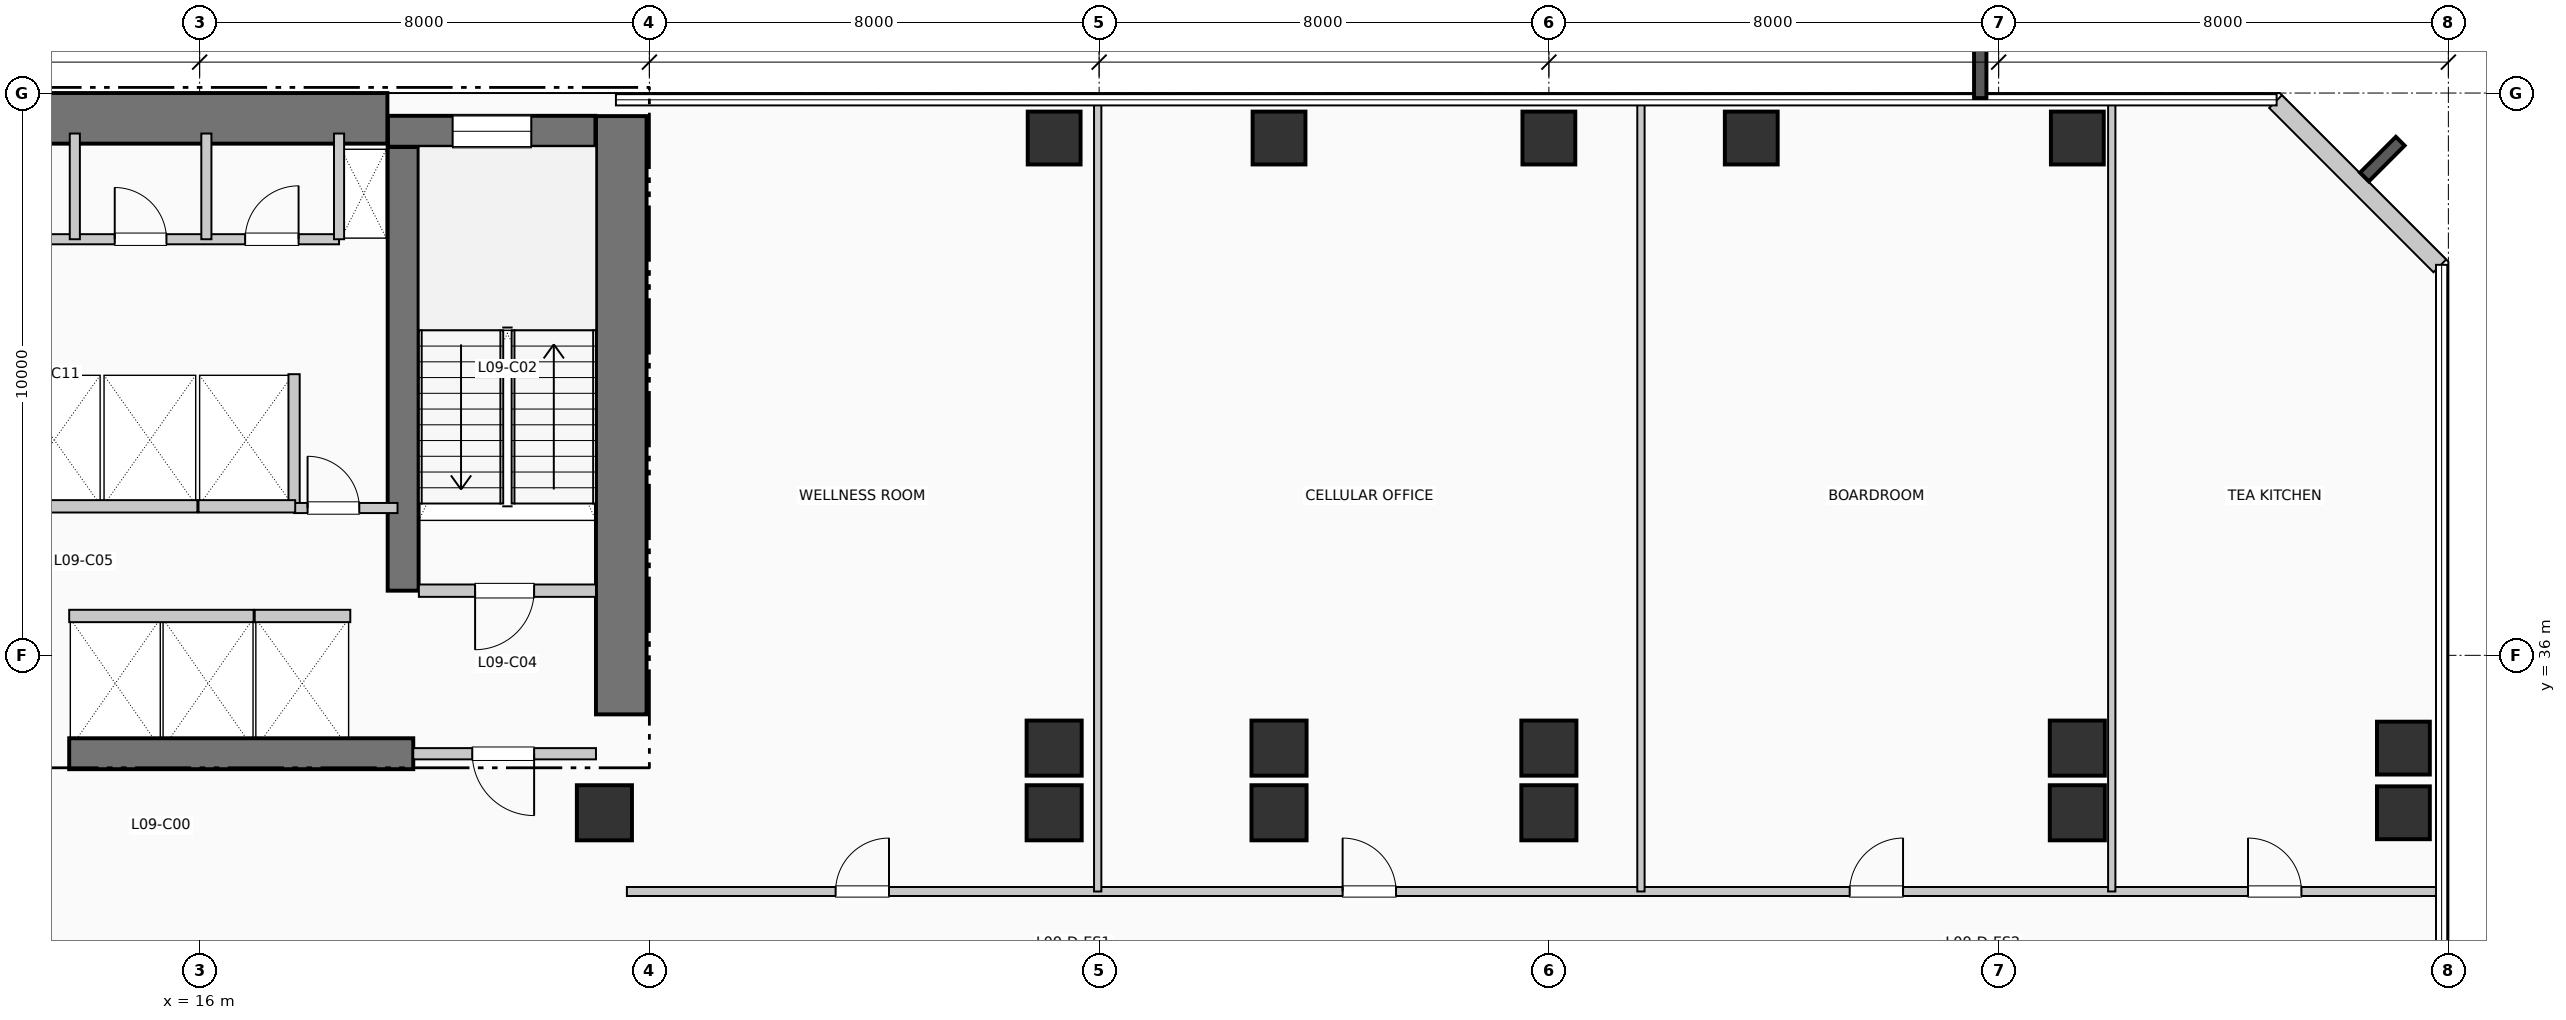
"""IFC4 building model, lengths in metres.
Left out: names, types, materials, properties, quantities, classifications, styles, units other than length and angle.
Written with IfcOpenShell. Run it as: python <this file> out.ifc"""

import sys

from ifc_helpers import new_model, si_unit, direction, frame, frame_2d, origin, origin_2d, place, context, subcontext, project, spatial, rectangle, extrude, element, fill, save


model = new_model("IFC4")
c1 = context("Model", 3, precision=1e-05, world=origin(), true_north=direction((0.0, 1.0)))
c2 = subcontext(c1, "Body", "Model", "MODEL_VIEW")
j1 = project(units=[si_unit("LENGTHUNIT", "METRE"), si_unit("PLANEANGLEUNIT", "RADIAN")], contexts=[c1])
p1 = place(None, origin())
s1 = spatial("IfcSite", under=j1, at=p1, CompositionType="ELEMENT")
p2 = place(p1, origin())
s2 = spatial("IfcBuilding", under=s1, at=p2, CompositionType="ELEMENT")
p3 = place(p2, frame((0.0, 0.0, 42.24)))
s3 = spatial("IfcBuildingStorey", under=s2, at=p3, CompositionType="ELEMENT", Elevation=42.24)
p4 = place(p3, frame((5.36, 45.55, 0.0), z_axis=(0.0, 0.0, 1.0), x_axis=(1.0, 0.0, 0.0)))
e1 = element("IfcWall", 1, at=p4, inside=s3, PredefinedType="SHEAR", context=c2, shape_type="SweptSolid", body=[
    extrude(rectangle(XDim=13.98, YDim=0.9, at=frame_2d((6.99, 0.0))), origin(), (0.0, 0.0, 1.0), 3.96),
])
p5 = place(p3, frame((23.5, 34.95, 0.0), z_axis=(0.0, 0.0, 1.0), x_axis=(0.0, 1.0, 0.0)))
e2 = element("IfcWall", 2, at=p5, inside=s3, PredefinedType="SHEAR", context=c2, shape_type="SweptSolid", body=[
    extrude(rectangle(XDim=10.64, YDim=0.9, at=frame_2d((5.32, 0.0))), origin(), (0.0, 0.0, 1.0), 3.96),
])
p6 = place(p3, frame((13.68, 34.25, 0.0), z_axis=(0.0, 0.0, 1.0), x_axis=(1.0, 0.0, 0.0)))
e3 = element("IfcWall", 3, at=p6, inside=s3, PredefinedType="SHEAR", context=c2, shape_type="SweptSolid", body=[
    extrude(rectangle(XDim=6.12, YDim=0.55, at=frame_2d((3.06, 0.0))), origin(), (0.0, 0.0, 1.0), 3.96),
])
p7 = place(p3, frame((19.62, 37.15, 0.0), z_axis=(0.0, 0.0, 1.0), x_axis=(0.0, 1.0, 0.0)))
e4 = element("IfcWall", 4, at=p7, inside=s3, PredefinedType="SHEAR", context=c2, shape_type="SweptSolid", body=[
    extrude(rectangle(XDim=7.89, YDim=0.55, at=frame_2d((3.945, 0.0))), origin(), (0.0, 0.0, 1.0), 3.96),
])
p8 = place(p3, frame((19.35, 45.32, 0.0), z_axis=(0.0, 0.0, 1.0), x_axis=(1.0, 0.0, 0.0)))
e5 = element("IfcWall", 5, at=p8, inside=s3, PredefinedType="SHEAR", context=c2, shape_type="SweptSolid", body=[
    extrude(rectangle(XDim=3.69, YDim=0.55, at=frame_2d((1.845, 0.0))), origin(), (0.0, 0.0, 1.0), 3.96),
])
p9 = place(p8, frame((1.15, 0.0, 1.05)))
e6 = element("IfcOpeningElement", 6, at=p9, cuts=e5, PredefinedType="OPENING", context=c2, shape_type="SweptSolid", body=[
    extrude(rectangle(XDim=1.4, YDim=1.8, at=frame_2d((0.7, 0.9))), frame((0.0, 0.285, 0.0), z_axis=(0.0, -1.0, 0.0), x_axis=(1.0, 0.0, 0.0)), (0.0, 0.0, 1.0), 0.57),
])
for number, where, z_axis, x_axis in (
    (7, (23.2, 33.2, 0.0), (0.0, 0.0, 1.0), (1.0, 0.0, 0.0)),
    (8, (31.2, 33.2, 0.0), (0.0, 0.0, 1.0), (1.0, 0.0, 0.0)),
    (9, (31.2, 34.35, 0.0), (0.0, 0.0, 1.0), (1.0, 0.0, 0.0)),
):
    element("IfcColumn", number, at=place(p3, frame(where, z_axis=z_axis, x_axis=x_axis)), inside=s3, PredefinedType="COLUMN", context=c2, shape_type="SweptSolid", body=[
        extrude(rectangle(XDim=0.98, YDim=0.98, at=origin_2d()), origin(), (0.0, 0.0, 1.0), 3.96),
    ])
p10 = place(p3, frame((31.2, 45.2, 0.0), z_axis=(0.0, 0.0, 1.0), x_axis=(1.0, 0.0, 0.0)))
e10 = element("IfcColumn", 10, at=p10, inside=s3, PredefinedType="COLUMN", context=c2, shape_type="SweptSolid", body=[
    extrude(rectangle(XDim=0.94, YDim=0.94, at=origin_2d()), origin(), (0.0, 0.0, 1.0), 3.96),
])
for number, where, z_axis, x_axis in (
    (11, (35.2, 33.2, 0.0), (0.0, 0.0, 1.0), (1.0, 0.0, 0.0)),
    (12, (35.2, 34.35, 0.0), (0.0, 0.0, 1.0), (1.0, 0.0, 0.0)),
):
    element("IfcColumn", number, at=place(p3, frame(where, z_axis=z_axis, x_axis=x_axis)), inside=s3, PredefinedType="COLUMN", context=c2, shape_type="SweptSolid", body=[
        extrude(rectangle(XDim=0.98, YDim=0.98, at=origin_2d()), origin(), (0.0, 0.0, 1.0), 3.96),
    ])
p11 = place(p3, frame((35.2, 45.2, 0.0), z_axis=(0.0, 0.0, 1.0), x_axis=(1.0, 0.0, 0.0)))
e13 = element("IfcColumn", 13, at=p11, inside=s3, PredefinedType="COLUMN", context=c2, shape_type="SweptSolid", body=[
    extrude(rectangle(XDim=0.94, YDim=0.94, at=origin_2d()), origin(), (0.0, 0.0, 1.0), 3.96),
])
for number, where, z_axis, x_axis in (
    (14, (40.0, 33.2, 0.0), (0.0, 0.0, 1.0), (1.0, 0.0, 0.0)),
    (15, (40.0, 34.35, 0.0), (0.0, 0.0, 1.0), (1.0, 0.0, 0.0)),
):
    element("IfcColumn", number, at=place(p3, frame(where, z_axis=z_axis, x_axis=x_axis)), inside=s3, PredefinedType="COLUMN", context=c2, shape_type="SweptSolid", body=[
        extrude(rectangle(XDim=0.98, YDim=0.98, at=origin_2d()), origin(), (0.0, 0.0, 1.0), 3.96),
    ])
for number, where, z_axis, x_axis in (
    (16, (40.0, 45.2, 0.0), (0.0, 0.0, 1.0), (1.0, 0.0, 0.0)),
    (17, (43.6, 45.2, 0.0), (0.0, 0.0, 1.0), (1.0, 0.0, 0.0)),
):
    element("IfcColumn", number, at=place(p3, frame(where, z_axis=z_axis, x_axis=x_axis)), inside=s3, PredefinedType="COLUMN", context=c2, shape_type="SweptSolid", body=[
        extrude(rectangle(XDim=0.94, YDim=0.94, at=origin_2d()), origin(), (0.0, 0.0, 1.0), 3.96),
    ])
for number, where, z_axis, x_axis in (
    (18, (49.4, 33.2, 0.0), (0.0, 0.0, 1.0), (1.0, 0.0, 0.0)),
    (19, (49.4, 34.35, 0.0), (0.0, 0.0, 1.0), (1.0, 0.0, 0.0)),
):
    element("IfcColumn", number, at=place(p3, frame(where, z_axis=z_axis, x_axis=x_axis)), inside=s3, PredefinedType="COLUMN", context=c2, shape_type="SweptSolid", body=[
        extrude(rectangle(XDim=0.98, YDim=0.98, at=origin_2d()), origin(), (0.0, 0.0, 1.0), 3.96),
    ])
for number, where, z_axis, x_axis in (
    (20, (49.4, 45.2, 0.0), (0.0, 0.0, 1.0), (1.0, 0.0, 0.0)),
    (21, (55.2, 33.2, 0.0), (0.0, 0.0, 1.0), (1.0, 0.0, 0.0)),
    (22, (55.2, 34.35, 0.0), (0.0, 0.0, 1.0), (1.0, 0.0, 0.0)),
):
    element("IfcColumn", number, at=place(p3, frame(where, z_axis=z_axis, x_axis=x_axis)), inside=s3, PredefinedType="COLUMN", context=c2, shape_type="SweptSolid", body=[
        extrude(rectangle(XDim=0.94, YDim=0.94, at=origin_2d()), origin(), (0.0, 0.0, 1.0), 3.96),
    ])
p12 = place(p3, frame((55.848, 42.926, 0.0), z_axis=(0.0, 0.0, 1.0), x_axis=(-0.707106781187, 0.707106781187, 0.0)))
e23 = element("IfcWall", 23, at=p12, inside=s3, PredefinedType="SOLIDWALL", context=c2, shape_type="SweptSolid", body=[
    extrude(rectangle(XDim=4.133, YDim=0.32, at=frame_2d((2.066, 0.0))), origin(), (0.0, 0.0, 1.0), 3.71),
])
p13 = place(p3, frame((19.9, 37.15, 0.0), z_axis=(0.0, 0.0, 1.0), x_axis=(1.0, 0.0, 0.0)))
e24 = element("IfcWall", 24, at=p13, inside=s3, PredefinedType="PARTITIONING", context=c2, shape_type="SweptSolid", body=[
    extrude(rectangle(XDim=3.15, YDim=0.22, at=frame_2d((1.575, 0.0))), origin(), (0.0, 0.0, 1.0), 3.71),
])
p14 = place(p13, frame((2.05, 0.0, 0.0), z_axis=(0.0, 0.0, 1.0), x_axis=(-1.0, 0.0, 0.0)))
e25 = element("IfcOpeningElement", 25, at=p14, cuts=e24, PredefinedType="OPENING", context=c2, shape_type="SweptSolid", body=[
    extrude(rectangle(XDim=1.05, YDim=2.15, at=frame_2d((0.525, 1.075))), frame((0.0, 0.12, 0.0), z_axis=(0.0, -1.0, 0.0), x_axis=(1.0, 0.0, 0.0)), (0.0, 0.0, 1.0), 0.24),
])
p15 = place(p3, frame((19.8, 34.25, 0.0), z_axis=(0.0, 0.0, 1.0), x_axis=(1.0, 0.0, 0.0)))
e26 = element("IfcWall", 26, at=p15, inside=s3, PredefinedType="PARTITIONING", context=c2, shape_type="SweptSolid", body=[
    extrude(rectangle(XDim=3.25, YDim=0.2, at=frame_2d((1.625, 0.0))), origin(), (0.0, 0.0, 1.0), 3.71),
])
p16 = place(p15, frame((2.15, 0.0, 0.0), z_axis=(0.0, 0.0, 1.0), x_axis=(-1.0, 0.0, 0.0)))
e27 = element("IfcOpeningElement", 27, at=p16, cuts=e26, PredefinedType="OPENING", context=c2, shape_type="SweptSolid", body=[
    extrude(rectangle(XDim=1.1, YDim=2.15, at=frame_2d((0.55, 1.075))), frame((0.0, 0.11, 0.0), z_axis=(0.0, -1.0, 0.0), x_axis=(1.0, 0.0, 0.0)), (0.0, 0.0, 1.0), 0.22),
])
p17 = place(p3, frame((17.68, 38.65, 0.0), z_axis=(0.0, 0.0, 1.0), x_axis=(0.0, 1.0, 0.0)))
e28 = element("IfcWall", 28, at=p17, inside=s3, PredefinedType="PARTITIONING", context=c2, shape_type="SweptSolid", body=[
    extrude(rectangle(XDim=2.35, YDim=0.2, at=frame_2d((1.175, 0.0))), origin(), (0.0, 0.0, 1.0), 3.71),
])
p18 = place(p3, frame((17.68, 38.62, 0.0), z_axis=(0.0, 0.0, 1.0), x_axis=(1.0, 0.0, 0.0)))
e29 = element("IfcWall", 29, at=p18, inside=s3, PredefinedType="PARTITIONING", context=c2, shape_type="SweptSolid", body=[
    extrude(rectangle(XDim=1.84, YDim=0.18, at=frame_2d((0.92, 0.0))), origin(), (0.0, 0.0, 1.0), 3.71),
])
p19 = place(p18, frame((0.24, 0.0, 0.0)))
e30 = element("IfcOpeningElement", 30, at=p19, cuts=e29, PredefinedType="OPENING", context=c2, shape_type="SweptSolid", body=[
    extrude(rectangle(XDim=0.92, YDim=2.1, at=frame_2d((0.46, 1.05))), frame((0.0, 0.1, 0.0), z_axis=(0.0, -1.0, 0.0), x_axis=(1.0, 0.0, 0.0)), (0.0, 0.0, 1.0), 0.2),
])
p20 = place(p3, frame((13.68, 36.7, 0.0), z_axis=(0.0, 0.0, 1.0), x_axis=(1.0, 0.0, 0.0)))
e31 = element("IfcWall", 31, at=p20, inside=s3, PredefinedType="PARTITIONING", context=c2, shape_type="SweptSolid", body=[
    extrude(rectangle(XDim=3.28, YDim=0.22, at=frame_2d((1.64, 0.0))), origin(), (0.0, 0.0, 1.0), 3.71),
])
p21 = place(p3, frame((12.58, 38.65, 0.0), z_axis=(0.0, 0.0, 1.0), x_axis=(1.0, 0.0, 0.0)))
e32 = element("IfcWall", 32, at=p21, inside=s3, PredefinedType="PARTITIONING", context=c2, shape_type="SweptSolid", body=[
    extrude(rectangle(XDim=3.38, YDim=0.22, at=frame_2d((1.69, 0.0))), origin(), (0.0, 0.0, 1.0), 3.71),
])
p22 = place(p3, frame((16.98, 36.7, 0.0), z_axis=(0.0, 0.0, 1.0), x_axis=(1.0, 0.0, 0.0)))
e33 = element("IfcWall", 33, at=p22, inside=s3, PredefinedType="PARTITIONING", context=c2, shape_type="SweptSolid", body=[
    extrude(rectangle(XDim=1.7, YDim=0.22, at=frame_2d((0.85, 0.0))), origin(), (0.0, 0.0, 1.0), 3.71),
])
p23 = place(p3, frame((15.98, 38.65, 0.0), z_axis=(0.0, 0.0, 1.0), x_axis=(1.0, 0.0, 0.0)))
e34 = element("IfcWall", 34, at=p23, inside=s3, PredefinedType="PARTITIONING", context=c2, shape_type="SweptSolid", body=[
    extrude(rectangle(XDim=1.72, YDim=0.22, at=frame_2d((0.86, 0.0))), origin(), (0.0, 0.0, 1.0), 3.71),
])
p24 = place(p3, frame((9.15, 43.4, 0.0), z_axis=(0.0, 0.0, 1.0), x_axis=(1.0, 0.0, 0.0)))
e35 = element("IfcWall", 35, at=p24, inside=s3, PredefinedType="PLUMBINGWALL", context=c2, shape_type="SweptSolid", body=[
    extrude(rectangle(XDim=9.33, YDim=0.18, at=frame_2d((4.665, 0.0))), origin(), (0.0, 0.0, 1.0), 3.71),
])
p25 = place(p24, frame((0.72, 0.0, 0.0)))
e36 = element("IfcOpeningElement", 36, at=p25, cuts=e35, PredefinedType="OPENING", context=c2, shape_type="SweptSolid", body=[
    extrude(rectangle(XDim=0.92, YDim=2.1, at=frame_2d((0.46, 1.05))), frame((0.0, 0.1, 0.0), z_axis=(0.0, -1.0, 0.0), x_axis=(1.0, 0.0, 0.0)), (0.0, 0.0, 1.0), 0.2),
])
p26 = place(p24, frame((3.02, 0.0, 0.0)))
e37 = element("IfcOpeningElement", 37, at=p26, cuts=e35, PredefinedType="OPENING", context=c2, shape_type="SweptSolid", body=[
    extrude(rectangle(XDim=0.92, YDim=2.1, at=frame_2d((0.46, 1.05))), frame((0.0, 0.1, 0.0), z_axis=(0.0, -1.0, 0.0), x_axis=(1.0, 0.0, 0.0)), (0.0, 0.0, 1.0), 0.2),
])
p27 = place(p24, frame((5.34, 0.0, 0.0)))
e38 = element("IfcOpeningElement", 38, at=p27, cuts=e35, PredefinedType="OPENING", context=c2, shape_type="SweptSolid", body=[
    extrude(rectangle(XDim=0.92, YDim=2.1, at=frame_2d((0.46, 1.05))), frame((0.0, 0.1, 0.0), z_axis=(0.0, -1.0, 0.0), x_axis=(1.0, 0.0, 0.0)), (0.0, 0.0, 1.0), 0.2),
])
p28 = place(p24, frame((7.66, 0.0, 0.0)))
e39 = element("IfcOpeningElement", 39, at=p28, cuts=e35, PredefinedType="OPENING", context=c2, shape_type="SweptSolid", body=[
    extrude(rectangle(XDim=0.95, YDim=2.1, at=frame_2d((0.475, 1.05))), frame((0.0, 0.1, 0.0), z_axis=(0.0, -1.0, 0.0), x_axis=(1.0, 0.0, 0.0)), (0.0, 0.0, 1.0), 0.2),
])
for number, where, z_axis, x_axis in (
    (40, (18.48, 43.4, 0.0), (0.0, 0.0, 1.0), (0.0, 1.0, 0.0)),
    (41, (13.78, 43.4, 0.0), (0.0, 0.0, 1.0), (0.0, 1.0, 0.0)),
    (42, (16.12, 43.4, 0.0), (0.0, 0.0, 1.0), (0.0, 1.0, 0.0)),
):
    element("IfcWall", number, at=place(p3, frame(where, z_axis=z_axis, x_axis=x_axis)), inside=s3, PredefinedType="PLUMBINGWALL", context=c2, shape_type="SweptSolid", body=[
        extrude(rectangle(XDim=1.88, YDim=0.18, at=frame_2d((0.94, 0.0))), origin(), (0.0, 0.0, 1.0), 3.71),
    ])
p29 = place(p3, frame((23.6, 31.8, 0.0), z_axis=(0.0, 0.0, 1.0), x_axis=(1.0, 0.0, 0.0)))
e43 = element("IfcWall", 43, at=p29, inside=s3, PredefinedType="PARTITIONING", context=c2, shape_type="SweptSolid", body=[
    extrude(rectangle(XDim=32.21, YDim=0.16, at=frame_2d((16.105, 0.0))), origin(), (0.0, 0.0, 1.0), 3.71),
])
p30 = place(p29, frame((3.712, 0.0, 0.0)))
e44 = element("IfcOpeningElement", 44, at=p30, cuts=e43, PredefinedType="OPENING", context=c2, shape_type="SweptSolid", body=[
    extrude(rectangle(XDim=0.95, YDim=2.15, at=frame_2d((0.475, 1.075))), frame((0.0, 0.09, 0.0), z_axis=(0.0, -1.0, 0.0), x_axis=(1.0, 0.0, 0.0)), (0.0, 0.0, 1.0), 0.18),
])
p31 = place(p29, frame((12.731, 0.0, 0.0)))
e45 = element("IfcOpeningElement", 45, at=p31, cuts=e43, PredefinedType="OPENING", context=c2, shape_type="SweptSolid", body=[
    extrude(rectangle(XDim=0.95, YDim=2.15, at=frame_2d((0.475, 1.075))), frame((0.0, 0.09, 0.0), z_axis=(0.0, -1.0, 0.0), x_axis=(1.0, 0.0, 0.0)), (0.0, 0.0, 1.0), 0.18),
])
p32 = place(p29, frame((21.75, 0.0, 0.0)))
e46 = element("IfcOpeningElement", 46, at=p32, cuts=e43, PredefinedType="OPENING", context=c2, shape_type="SweptSolid", body=[
    extrude(rectangle(XDim=0.95, YDim=2.15, at=frame_2d((0.475, 1.075))), frame((0.0, 0.09, 0.0), z_axis=(0.0, -1.0, 0.0), x_axis=(1.0, 0.0, 0.0)), (0.0, 0.0, 1.0), 0.18),
])
p33 = place(p29, frame((28.836, 0.0, 0.0)))
e47 = element("IfcOpeningElement", 47, at=p33, cuts=e43, PredefinedType="OPENING", context=c2, shape_type="SweptSolid", body=[
    extrude(rectangle(XDim=0.95, YDim=2.15, at=frame_2d((0.475, 1.075))), frame((0.0, 0.09, 0.0), z_axis=(0.0, -1.0, 0.0), x_axis=(1.0, 0.0, 0.0)), (0.0, 0.0, 1.0), 0.18),
])
for number, where, z_axis, x_axis in (
    (48, (31.975, 31.8, 0.0), (0.0, 0.0, 1.0), (0.0, 1.0, 0.0)),
    (49, (41.638, 31.8, 0.0), (0.0, 0.0, 1.0), (0.0, 1.0, 0.0)),
    (50, (50.012, 31.8, 0.0), (0.0, 0.0, 1.0), (0.0, 1.0, 0.0)),
):
    element("IfcWall", number, at=place(p3, frame(where, z_axis=z_axis, x_axis=x_axis)), inside=s3, PredefinedType="PARTITIONING", context=c2, shape_type="SweptSolid", body=[
        extrude(rectangle(XDim=14.01, YDim=0.13, at=frame_2d((7.005, 0.0))), origin(), (0.0, 0.0, 1.0), 3.71),
    ])
p34 = place(p9, origin())
e51 = element("IfcWindow", 51, at=p34, inside=s3, PartitioningType="SINGLE_PANEL", PredefinedType="WINDOW", context=c2, shape_type="SweptSolid", body=[
    extrude(rectangle(XDim=1.4, YDim=1.8, at=frame_2d((0.7, 0.9))), frame((0.0, 0.03, 0.0), z_axis=(0.0, -1.0, 0.0), x_axis=(1.0, 0.0, 0.0)), (0.0, 0.0, 1.0), 0.06),
])
fill(e6, e51)
p35 = place(p14, origin())
e52 = element("IfcDoor", 52, at=p35, inside=s3, OperationType="SINGLE_SWING_LEFT", PredefinedType="DOOR", context=c2, shape_type="SweptSolid", body=[
    extrude(rectangle(XDim=1.05, YDim=2.15, at=frame_2d((0.525, 1.075))), frame((0.0, 0.025, 0.0), z_axis=(0.0, -1.0, 0.0), x_axis=(1.0, 0.0, 0.0)), (0.0, 0.0, 1.0), 0.05),
])
fill(e25, e52)
p36 = place(p16, origin())
e53 = element("IfcDoor", 53, at=p36, inside=s3, OperationType="SINGLE_SWING_RIGHT", PredefinedType="DOOR", context=c2, shape_type="SweptSolid", body=[
    extrude(rectangle(XDim=1.1, YDim=2.15, at=frame_2d((0.55, 1.075))), frame((0.0, 0.025, 0.0), z_axis=(0.0, -1.0, 0.0), x_axis=(1.0, 0.0, 0.0)), (0.0, 0.0, 1.0), 0.05),
])
fill(e27, e53)
p37 = place(p19, origin())
e54 = element("IfcDoor", 54, at=p37, inside=s3, OperationType="SINGLE_SWING_LEFT", PredefinedType="DOOR", context=c2, shape_type="SweptSolid", body=[
    extrude(rectangle(XDim=0.92, YDim=2.1, at=frame_2d((0.46, 1.05))), frame((0.0, 0.025, 0.0), z_axis=(0.0, -1.0, 0.0), x_axis=(1.0, 0.0, 0.0)), (0.0, 0.0, 1.0), 0.05),
])
fill(e30, e54)
p38 = place(p27, origin())
e55 = element("IfcDoor", 55, at=p38, inside=s3, OperationType="SINGLE_SWING_LEFT", PredefinedType="DOOR", context=c2, shape_type="SweptSolid", body=[
    extrude(rectangle(XDim=0.92, YDim=2.1, at=frame_2d((0.46, 1.05))), frame((0.0, 0.025, 0.0), z_axis=(0.0, -1.0, 0.0), x_axis=(1.0, 0.0, 0.0)), (0.0, 0.0, 1.0), 0.05),
])
fill(e38, e55)
p39 = place(p28, origin())
e56 = element("IfcDoor", 56, at=p39, inside=s3, OperationType="SINGLE_SWING_RIGHT", PredefinedType="DOOR", context=c2, shape_type="SweptSolid", body=[
    extrude(rectangle(XDim=0.95, YDim=2.1, at=frame_2d((0.475, 1.05))), frame((0.0, 0.025, 0.0), z_axis=(0.0, -1.0, 0.0), x_axis=(1.0, 0.0, 0.0)), (0.0, 0.0, 1.0), 0.05),
])
fill(e39, e56)
p40 = place(p30, origin())
e57 = element("IfcDoor", 57, at=p40, inside=s3, OperationType="SINGLE_SWING_RIGHT", PredefinedType="DOOR", context=c2, shape_type="SweptSolid", body=[
    extrude(rectangle(XDim=0.95, YDim=2.15, at=frame_2d((0.475, 1.075))), frame((0.0, 0.025, 0.0), z_axis=(0.0, -1.0, 0.0), x_axis=(1.0, 0.0, 0.0)), (0.0, 0.0, 1.0), 0.05),
])
fill(e44, e57)
p41 = place(p31, origin())
e58 = element("IfcDoor", 58, at=p41, inside=s3, OperationType="SINGLE_SWING_LEFT", PredefinedType="DOOR", context=c2, shape_type="SweptSolid", body=[
    extrude(rectangle(XDim=0.95, YDim=2.15, at=frame_2d((0.475, 1.075))), frame((0.0, 0.025, 0.0), z_axis=(0.0, -1.0, 0.0), x_axis=(1.0, 0.0, 0.0)), (0.0, 0.0, 1.0), 0.05),
])
fill(e45, e58)
p42 = place(p32, origin())
e59 = element("IfcDoor", 59, at=p42, inside=s3, OperationType="SINGLE_SWING_RIGHT", PredefinedType="DOOR", context=c2, shape_type="SweptSolid", body=[
    extrude(rectangle(XDim=0.95, YDim=2.15, at=frame_2d((0.475, 1.075))), frame((0.0, 0.025, 0.0), z_axis=(0.0, -1.0, 0.0), x_axis=(1.0, 0.0, 0.0)), (0.0, 0.0, 1.0), 0.05),
])
fill(e46, e59)
p43 = place(p33, origin())
e60 = element("IfcDoor", 60, at=p43, inside=s3, OperationType="SINGLE_SWING_LEFT", PredefinedType="DOOR", context=c2, shape_type="SweptSolid", body=[
    extrude(rectangle(XDim=0.95, YDim=2.15, at=frame_2d((0.475, 1.075))), frame((0.0, 0.025, 0.0), z_axis=(0.0, -1.0, 0.0), x_axis=(1.0, 0.0, 0.0)), (0.0, 0.0, 1.0), 0.05),
])
fill(e47, e60)
save(model, sys.argv[1])
